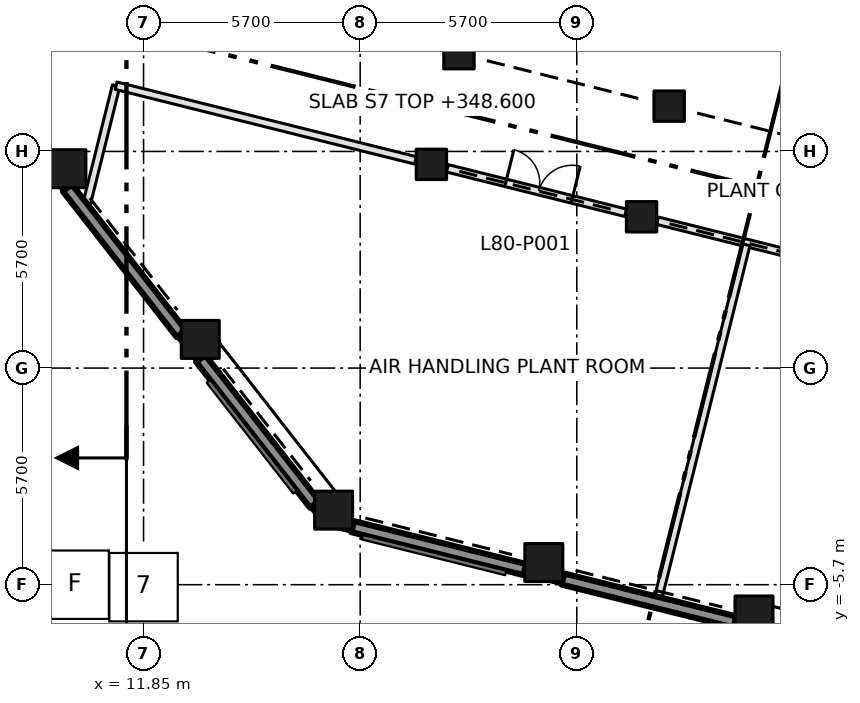
"""IFC4 building model, lengths in metres.
Left out: names, types, materials, properties, quantities, classifications, styles, units other than length and angle.
Written with IfcOpenShell. Run it as: python <this file> out.ifc"""

import sys

from ifc_helpers import new_model, si_unit, direction, frame, frame_2d, origin, origin_2d, place, context, subcontext, project, spatial, rectangle, extrude, element, fill, save


model = new_model("IFC4")
c1 = context("Model", 3, precision=1e-05, world=origin(), true_north=direction((0.0, 1.0)))
c2 = subcontext(c1, "Body", "Model", "MODEL_VIEW")
j1 = project(units=[si_unit("LENGTHUNIT", "METRE"), si_unit("PLANEANGLEUNIT", "RADIAN")], contexts=[c1])
p1 = place(None, origin())
s1 = spatial("IfcSite", under=j1, at=p1, CompositionType="ELEMENT")
p2 = place(p1, origin())
s2 = spatial("IfcBuilding", under=s1, at=p2, CompositionType="ELEMENT")
p3 = place(p2, frame((0.0, 0.0, 348.6)))
s3 = spatial("IfcBuildingStorey", under=s2, at=p3, CompositionType="ELEMENT", Elevation=348.6)
for number, where, z_axis, x_axis in (
    (1, (16.851, -3.738, 0.0), (0.0, 0.0, 1.0), (1.0, 0.0, 0.0)),
    (2, (13.342, 0.754, 0.0), (0.0, 0.0, 1.0), (1.0, 0.0, 0.0)),
    (3, (9.833, 5.245, 0.0), (0.0, 0.0, 1.0), (1.0, 0.0, 0.0)),
    (4, (22.382, -5.117, 0.0), (0.0, 0.0, 1.0), (1.0, 0.0, 0.0)),
    (5, (27.912, -6.496, 0.0), (0.0, 0.0, 1.0), (1.0, 0.0, 0.0)),
):
    element("IfcColumn", number, at=place(p3, frame(where, z_axis=z_axis, x_axis=x_axis)), inside=s3, PredefinedType="COLUMN", context=c2, shape_type="SweptSolid", body=[
        extrude(rectangle(XDim=1.0, YDim=1.0, at=origin_2d()), origin(), (0.0, 0.0, 1.0), 5.4),
    ])
for number, where, z_axis, x_axis in (
    (6, (19.424, 5.36, 0.0), (0.0, 0.0, 1.0), (1.0, 0.0, 0.0)),
    (7, (24.954, 3.981, 0.0), (0.0, 0.0, 1.0), (1.0, 0.0, 0.0)),
    (8, (20.149, 8.271, 0.0), (0.0, 0.0, 1.0), (1.0, 0.0, 0.0)),
    (9, (25.68, 6.892, 0.0), (0.0, 0.0, 1.0), (1.0, 0.0, 0.0)),
):
    element("IfcColumn", number, at=place(p3, frame(where, z_axis=z_axis, x_axis=x_axis)), inside=s3, PredefinedType="COLUMN", context=c2, shape_type="SweptSolid", body=[
        extrude(rectangle(XDim=0.8, YDim=0.8, at=origin_2d()), origin(), (0.0, 0.0, 1.0), 5.4),
    ])
p4 = place(p3, frame((10.351, 4.313, 0.0), z_axis=(0.0, 0.0, 1.0), x_axis=(0.241909491623, 0.970298818851, 0.0)))
e10 = element("IfcWall", 10, at=p4, inside=s3, PredefinedType="PARTITIONING", context=c2, shape_type="SweptSolid", body=[
    extrude(rectangle(XDim=3.211, YDim=0.2, at=frame_2d((1.606, 0.0))), origin(), (0.0, 0.0, 1.0), 5.1),
])
p5 = place(p3, frame((11.128, 7.429, 0.0), z_axis=(0.0, 0.0, 1.0), x_axis=(0.970290934835, -0.241941112208, 0.0)))
e11 = element("IfcWall", 11, at=p5, inside=s3, PredefinedType="PARTITIONING", context=c2, shape_type="SweptSolid", body=[
    extrude(rectangle(XDim=8.117, YDim=0.2, at=frame_2d((4.059, 0.0))), origin(), (0.0, 0.0, 1.0), 5.1),
])
p6 = place(p3, frame((19.844, 5.256, 0.0), z_axis=(0.0, 0.0, 1.0), x_axis=(0.970255294877, -0.242083999393, 0.0)))
e12 = element("IfcWall", 12, at=p6, inside=s3, PredefinedType="PARTITIONING", context=c2, shape_type="SweptSolid", body=[
    extrude(rectangle(XDim=4.834, YDim=0.2, at=frame_2d((2.417, 0.0))), origin(), (0.0, 0.0, 1.0), 2.9),
])
p7 = place(p6, frame((1.58, 0.0, 0.0)))
e13 = element("IfcOpeningElement", 13, at=p7, cuts=e12, PredefinedType="OPENING", context=c2, shape_type="SweptSolid", body=[
    extrude(rectangle(XDim=1.8, YDim=2.1, at=frame_2d((0.9, 1.05))), frame((0.0, 0.11, 0.0), z_axis=(0.0, -1.0, 0.0), x_axis=(1.0, 0.0, 0.0)), (0.0, 0.0, 1.0), 0.22),
])
p8 = place(p3, frame((25.374, 3.877, 0.0), z_axis=(0.0, 0.0, 1.0), x_axis=(0.970278989292, -0.241989014088, 0.0)))
e14 = element("IfcWall", 14, at=p8, inside=s3, PredefinedType="PARTITIONING", context=c2, shape_type="SweptSolid", body=[
    extrude(rectangle(XDim=4.835, YDim=0.2, at=frame_2d((2.417, 0.0))), origin(), (0.0, 0.0, 1.0), 2.9),
])
p9 = place(p3, frame((25.393, -6.042, 0.0), z_axis=(0.0, 0.0, 1.0), x_axis=(0.241953313473, 0.97028789238, 0.0)))
e15 = element("IfcWall", 15, at=p9, inside=s3, PredefinedType="PARTITIONING", context=c2, shape_type="SweptSolid", body=[
    extrude(rectangle(XDim=9.57, YDim=0.2, at=frame_2d((4.785, 0.0))), origin(), (0.0, 0.0, 1.0), 5.1),
])
p10 = place(p3, frame((6.334, 9.237, 0.0), z_axis=(0.0, 0.0, 1.0), x_axis=(0.615608058482, -0.788052484503, 0.0)))
e16 = element("IfcWall", 16, at=p10, inside=s3, PredefinedType="SOLIDWALL", context=c2, shape_type="SweptSolid", body=[
    extrude(rectangle(XDim=4.872, YDim=0.3, at=frame_2d((2.436, 0.0))), origin(), (0.0, 0.0, 1.0), 4.4),
])
p11 = place(p3, frame((9.843, 4.745, 0.0), z_axis=(0.0, 0.0, 1.0), x_axis=(0.615705317883, -0.787976498082, 0.0)))
e17 = element("IfcWall", 17, at=p11, inside=s3, PredefinedType="SOLIDWALL", context=c2, shape_type="SweptSolid", body=[
    extrude(rectangle(XDim=4.871, YDim=0.3, at=frame_2d((2.436, 0.0))), origin(), (0.0, 0.0, 1.0), 4.4),
])
p12 = place(p3, frame((13.352, 0.254, 0.0), z_axis=(0.0, 0.0, 1.0), x_axis=(0.61572963607, -0.78795749585, 0.0)))
e18 = element("IfcWall", 18, at=p12, inside=s3, PredefinedType="SOLIDWALL", context=c2, shape_type="SweptSolid", body=[
    extrude(rectangle(XDim=4.871, YDim=0.3, at=frame_2d((2.435, 0.0))), origin(), (0.0, 0.0, 1.0), 4.4),
])
p13 = place(p3, frame((17.351, -4.172, 0.0), z_axis=(0.0, 0.0, 1.0), x_axis=(0.970335948358, -0.241760516472, 0.0)))
e19 = element("IfcWall", 19, at=p13, inside=s3, PredefinedType="SOLIDWALL", context=c2, shape_type="SweptSolid", body=[
    extrude(rectangle(XDim=4.669, YDim=0.3, at=frame_2d((2.335, 0.0))), origin(), (0.0, 0.0, 1.0), 4.4),
])
p14 = place(p3, frame((22.882, -5.551, 0.0), z_axis=(0.0, 0.0, 1.0), x_axis=(0.970323721059, -0.241809586967, 0.0)))
e20 = element("IfcWall", 20, at=p14, inside=s3, PredefinedType="SOLIDWALL", context=c2, shape_type="SweptSolid", body=[
    extrude(rectangle(XDim=4.668, YDim=0.3, at=frame_2d((2.334, 0.0))), origin(), (0.0, 0.0, 1.0), 4.4),
])
p15 = place(p7, origin())
e21 = element("IfcDoor", 21, at=p15, inside=s3, OperationType="DOUBLE_DOOR_SINGLE_SWING", PredefinedType="DOOR", context=c2, shape_type="SweptSolid", body=[
    extrude(rectangle(XDim=1.8, YDim=2.1, at=frame_2d((0.9, 1.05))), frame((0.0, 0.025, 0.0), z_axis=(0.0, -1.0, 0.0), x_axis=(1.0, 0.0, 0.0)), (0.0, 0.0, 1.0), 0.05),
])
fill(e13, e21)
save(model, sys.argv[1])
